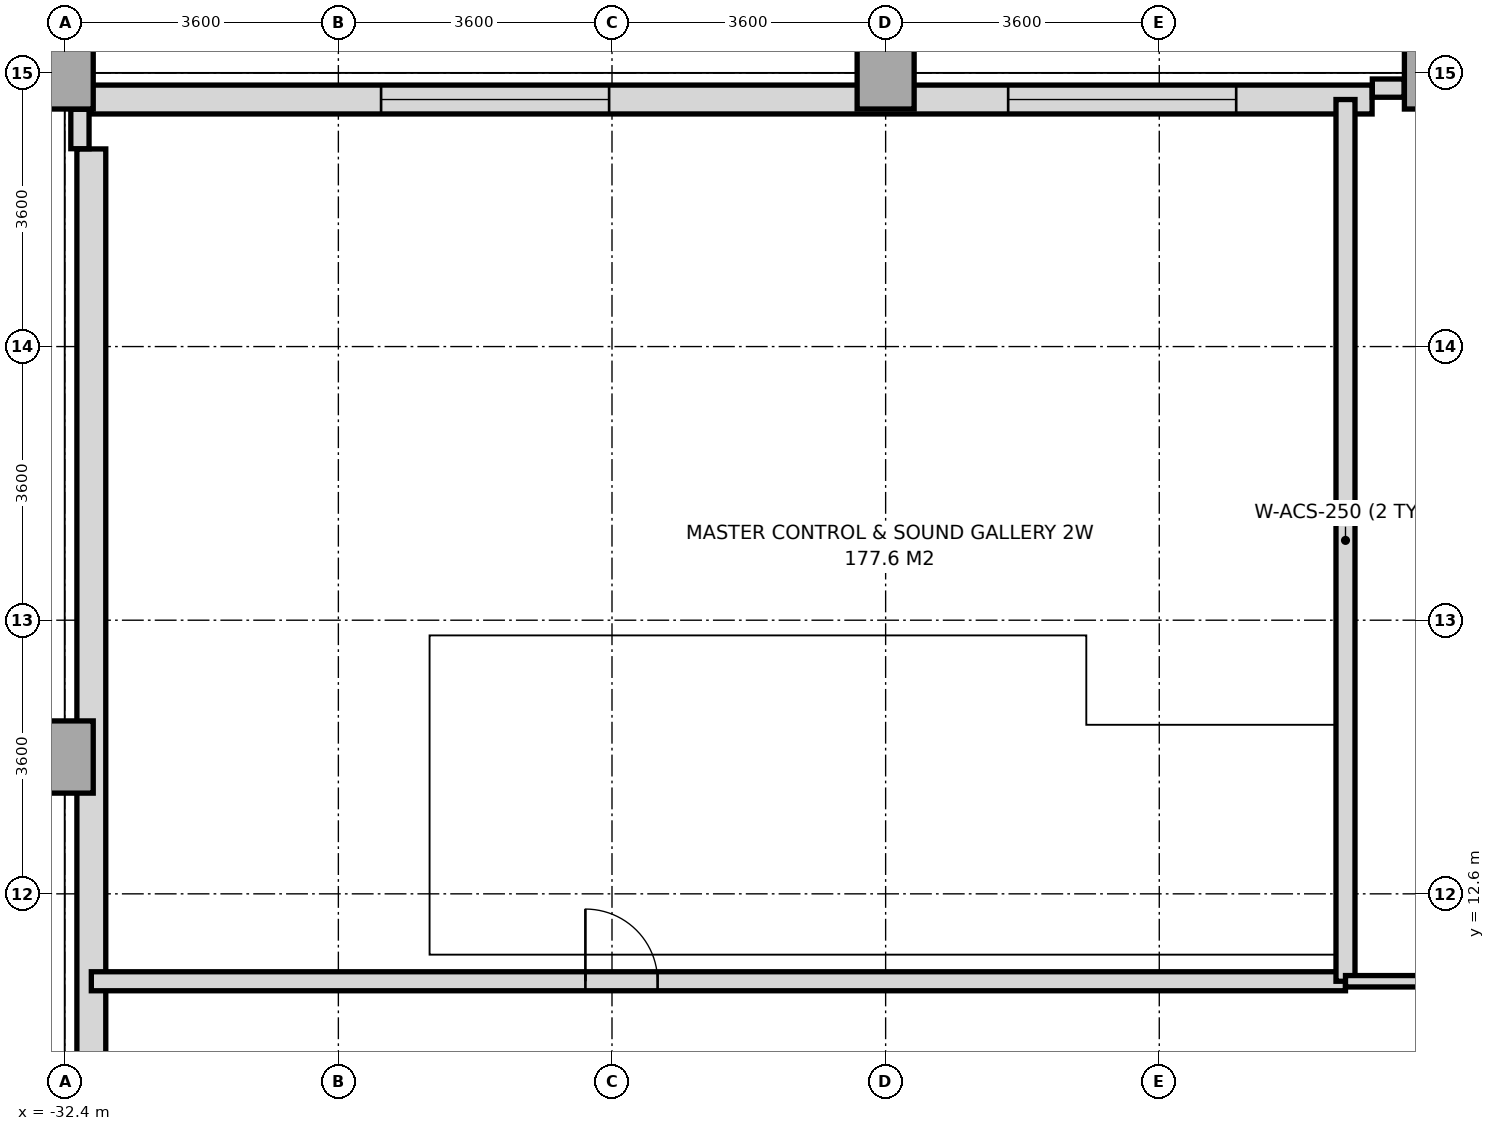
"""IFC4 building model, lengths in metres.
Left out: names, types, materials, properties, quantities, classifications, styles, units other than length and angle.
Written with IfcOpenShell. Run it as: python <this file> out.ifc"""

import sys

from ifc_helpers import new_model, si_unit, direction, frame, frame_2d, origin, origin_2d, place, context, subcontext, project, spatial, rectangle, extrude, source, transform, mapped, element, fill, save


model = new_model("IFC4")
c1 = context("Model", 3, precision=1e-05, world=origin(), true_north=direction((0.0, 1.0)))
c2 = subcontext(c1, "Body", "Model", "MODEL_VIEW")
j1 = project(units=[si_unit("LENGTHUNIT", "METRE"), si_unit("PLANEANGLEUNIT", "RADIAN")], contexts=[c1])
p1 = place(None, origin())
s1 = spatial("IfcSite", under=j1, at=p1, CompositionType="ELEMENT")
p2 = place(p1, origin())
s2 = spatial("IfcBuilding", under=s1, at=p2, CompositionType="ELEMENT")
p3 = place(p2, frame((0.0, 0.0, 10.2)))
s3 = spatial("IfcBuildingStorey", under=s2, at=p3, CompositionType="ELEMENT", Elevation=10.2)
m1 = source(origin(), c2, "Body", "SweptSolid", [
    extrude(rectangle(XDim=0.75, YDim=0.95, at=origin_2d()), origin(), (0.0, 0.0, 1.0), 5.15),
])
for number, where, z_axis, x_axis in (
    (1, (-32.4, 14.4, 0.0), (0.0, 0.0, 1.0), (1.0, 0.0, 0.0)),
    (2, (-32.4, 23.4, 0.0), (0.0, 0.0, 1.0), (1.0, 0.0, 0.0)),
    (3, (-21.6, 23.4, 0.0), (0.0, 0.0, 1.0), (1.0, 0.0, 0.0)),
    (4, (-14.4, 23.4, 0.0), (0.0, 0.0, 1.0), (1.0, 0.0, 0.0)),
):
    element("IfcColumn", number, at=place(p3, frame(where, z_axis=z_axis, x_axis=x_axis)), inside=s3, PredefinedType="COLUMN", context=c2, shape_type="MappedRepresentation", body=[
        mapped(m1, transform((0.0, 0.0, 0.0), x_axis=(1.0, 0.0, 0.0), y_axis=(0.0, 1.0, 0.0), z_axis=(0.0, 0.0, 1.0), scale=1.0)),
    ])
p4 = place(p3, frame((-32.05, 23.05, 0.0), z_axis=(0.0, 0.0, 1.0), x_axis=(1.0, 0.0, 0.0)))
e5 = element("IfcWall", 5, at=p4, inside=s3, PredefinedType="SOLIDWALL", context=c2, shape_type="SweptSolid", body=[
    extrude(rectangle(XDim=16.85, YDim=0.38, at=frame_2d((8.425, 0.0))), origin(), (0.0, 0.0, 1.0), 4.4),
])
p5 = place(p4, frame((3.812, 0.0, 0.95)))
e6 = element("IfcOpeningElement", 6, at=p5, cuts=e5, PredefinedType="OPENING", context=c2, shape_type="SweptSolid", body=[
    extrude(rectangle(XDim=3.0, YDim=2.4, at=frame_2d((1.5, 1.2))), frame((0.0, 0.2, 0.0), z_axis=(0.0, -1.0, 0.0), x_axis=(1.0, 0.0, 0.0)), (0.0, 0.0, 1.0), 0.4),
])
p6 = place(p4, frame((12.062, 0.0, 0.95)))
e7 = element("IfcOpeningElement", 7, at=p6, cuts=e5, PredefinedType="OPENING", context=c2, shape_type="SweptSolid", body=[
    extrude(rectangle(XDim=3.0, YDim=2.4, at=frame_2d((1.5, 1.2))), frame((0.0, 0.2, 0.0), z_axis=(0.0, -1.0, 0.0), x_axis=(1.0, 0.0, 0.0)), (0.0, 0.0, 1.0), 0.4),
])
p7 = place(p3, frame((-32.05, -18.8, 0.0), z_axis=(0.0, 0.0, 1.0), x_axis=(0.0, 1.0, 0.0)))
e8 = element("IfcWall", 8, at=p7, inside=s3, PredefinedType="SOLIDWALL", context=c2, shape_type="SweptSolid", body=[
    extrude(rectangle(XDim=41.2, YDim=0.38, at=frame_2d((20.6, 0.0))), origin(), (0.0, 0.0, 1.0), 4.4),
])
p8 = place(p7, frame((5.6, 0.0, 0.95)))
e9 = element("IfcOpeningElement", 9, at=p8, cuts=e8, PredefinedType="OPENING", context=c2, shape_type="SweptSolid", body=[
    extrude(rectangle(XDim=3.0, YDim=2.4, at=frame_2d((1.5, 1.2))), frame((0.0, 0.2, 0.0), z_axis=(0.0, -1.0, 0.0), x_axis=(1.0, 0.0, 0.0)), (0.0, 0.0, 1.0), 0.4),
])
p9 = place(p7, frame((12.8, 0.0, 0.95)))
e10 = element("IfcOpeningElement", 10, at=p9, cuts=e8, PredefinedType="OPENING", context=c2, shape_type="SweptSolid", body=[
    extrude(rectangle(XDim=3.0, YDim=2.4, at=frame_2d((1.5, 1.2))), frame((0.0, 0.2, 0.0), z_axis=(0.0, -1.0, 0.0), x_axis=(1.0, 0.0, 0.0)), (0.0, 0.0, 1.0), 0.4),
])
p10 = place(p7, frame((21.8, 0.0, 0.95)))
e11 = element("IfcOpeningElement", 11, at=p10, cuts=e8, PredefinedType="OPENING", context=c2, shape_type="SweptSolid", body=[
    extrude(rectangle(XDim=3.0, YDim=2.4, at=frame_2d((1.5, 1.2))), frame((0.0, 0.2, 0.0), z_axis=(0.0, -1.0, 0.0), x_axis=(1.0, 0.0, 0.0)), (0.0, 0.0, 1.0), 0.4),
])
p11 = place(p3, frame((-32.2, 22.403, 0.0), z_axis=(0.0, 0.0, 1.0), x_axis=(0.0, 1.0, 0.0)))
e12 = element("IfcWall", 12, at=p11, inside=s3, PredefinedType="PARAPET", context=c2, shape_type="SweptSolid", body=[
    extrude(rectangle(XDim=0.519, YDim=0.24, at=frame_2d((0.26, 0.0))), origin(), (0.0, 0.0, 1.0), 1.15),
])
p12 = place(p3, frame((-15.197, 23.2, 0.0), z_axis=(0.0, 0.0, 1.0), x_axis=(1.0, 0.0, 0.0)))
e13 = element("IfcWall", 13, at=p12, inside=s3, PredefinedType="PARAPET", context=c2, shape_type="SweptSolid", body=[
    extrude(rectangle(XDim=0.419, YDim=0.24, at=frame_2d((0.209, 0.0))), origin(), (0.0, 0.0, 1.0), 1.15),
])
p13 = place(p3, frame((-32.05, 11.45, 0.0), z_axis=(0.0, 0.0, 1.0), x_axis=(1.0, 0.0, 0.0)))
e14 = element("IfcWall", 14, at=p13, inside=s3, PredefinedType="SOLIDWALL", context=c2, shape_type="SweptSolid", body=[
    extrude(rectangle(XDim=16.5, YDim=0.25, at=frame_2d((8.25, 0.0))), origin(), (0.0, 0.0, 1.0), 5.15),
])
p14 = place(p13, frame((6.5, 0.0, 0.0)))
e15 = element("IfcOpeningElement", 15, at=p14, cuts=e14, PredefinedType="OPENING", context=c2, shape_type="SweptSolid", body=[
    extrude(rectangle(XDim=0.95, YDim=2.15, at=frame_2d((0.475, 1.075))), frame((0.0, 0.135, 0.0), z_axis=(0.0, -1.0, 0.0), x_axis=(1.0, 0.0, 0.0)), (0.0, 0.0, 1.0), 0.27),
])
p15 = place(p3, frame((-15.55, 11.45, 0.0), z_axis=(0.0, 0.0, 1.0), x_axis=(0.0, 1.0, 0.0)))
e16 = element("IfcWall", 16, at=p15, inside=s3, PredefinedType="SOLIDWALL", context=c2, shape_type="SweptSolid", body=[
    extrude(rectangle(XDim=11.6, YDim=0.25, at=frame_2d((5.8, 0.0))), origin(), (0.0, 0.0, 1.0), 5.15),
])
p16 = place(p3, frame((-15.55, 11.45, 0.0), z_axis=(0.0, 0.0, 1.0), x_axis=(1.0, 0.0, 0.0)))
e17 = element("IfcWall", 17, at=p16, inside=s3, PredefinedType="PARTITIONING", context=c2, shape_type="SweptSolid", body=[
    extrude(rectangle(XDim=22.45, YDim=0.15, at=frame_2d((11.225, 0.0))), origin(), (0.0, 0.0, 1.0), 4.55),
])
p17 = place(p16, frame((8.2, 0.0, 0.0)))
e18 = element("IfcOpeningElement", 18, at=p17, cuts=e17, PredefinedType="OPENING", context=c2, shape_type="SweptSolid", body=[
    extrude(rectangle(XDim=1.1, YDim=2.2, at=frame_2d((0.55, 1.1))), frame((0.0, 0.085, 0.0), z_axis=(0.0, -1.0, 0.0), x_axis=(1.0, 0.0, 0.0)), (0.0, 0.0, 1.0), 0.17),
])
m2 = source(origin(), c2, "Body", "SweptSolid", [
    extrude(rectangle(XDim=3.0, YDim=2.4, at=frame_2d((1.5, 1.2))), frame((0.0, 0.03, 0.0), z_axis=(0.0, -1.0, 0.0), x_axis=(1.0, 0.0, 0.0)), (0.0, 0.0, 1.0), 0.06),
])
p18 = place(p5, origin())
e19 = element("IfcWindow", 19, at=p18, inside=s3, PartitioningType="SINGLE_PANEL", PredefinedType="WINDOW", context=c2, shape_type="MappedRepresentation", body=[
    mapped(m2, transform((0.0, 0.0, 0.0), x_axis=(1.0, 0.0, 0.0), y_axis=(0.0, 1.0, 0.0), z_axis=(0.0, 0.0, 1.0), scale=1.0)),
])
fill(e6, e19)
p19 = place(p6, origin())
e20 = element("IfcWindow", 20, at=p19, inside=s3, PartitioningType="SINGLE_PANEL", PredefinedType="WINDOW", context=c2, shape_type="MappedRepresentation", body=[
    mapped(m2, transform((0.0, 0.0, 0.0), x_axis=(1.0, 0.0, 0.0), y_axis=(0.0, 1.0, 0.0), z_axis=(0.0, 0.0, 1.0), scale=1.0)),
])
fill(e7, e20)
m3 = source(origin(), c2, "Body", "SweptSolid", [
    extrude(rectangle(XDim=0.95, YDim=2.15, at=frame_2d((0.475, 1.075))), frame((0.0, 0.025, 0.0), z_axis=(0.0, -1.0, 0.0), x_axis=(1.0, 0.0, 0.0)), (0.0, 0.0, 1.0), 0.05),
])
p20 = place(p14, origin())
e21 = element("IfcDoor", 21, at=p20, inside=s3, OperationType="SINGLE_SWING_LEFT", PredefinedType="DOOR", context=c2, shape_type="MappedRepresentation", body=[
    mapped(m3, transform((0.0, 0.0, 0.0), x_axis=(1.0, 0.0, 0.0), y_axis=(0.0, 1.0, 0.0), z_axis=(0.0, 0.0, 1.0), scale=1.0)),
])
fill(e15, e21)
save(model, sys.argv[1])
